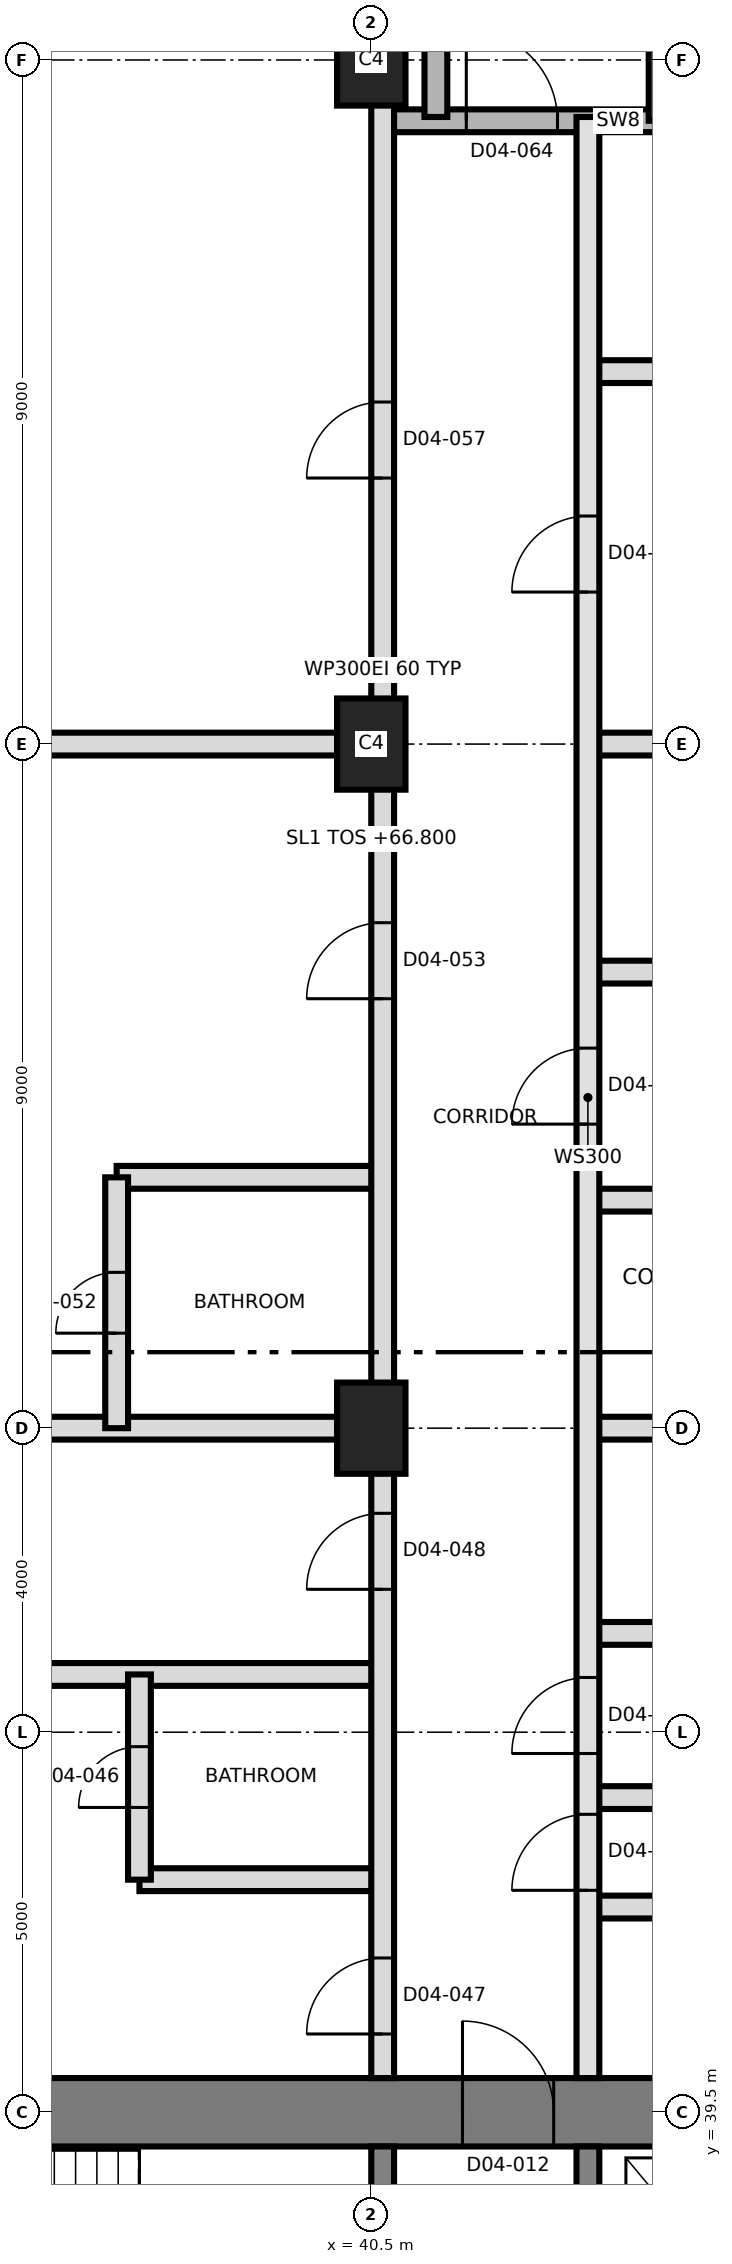
"""IFC4 building model, lengths in metres.
Left out: names, types, materials, properties, quantities, classifications, styles, units other than length and angle.
Written with IfcOpenShell. Run it as: python <this file> out.ifc"""

import sys

from ifc_helpers import new_model, si_unit, direction, frame, frame_2d, origin, origin_2d, place, context, subcontext, project, spatial, rectangle, extrude, element, fill, save


model = new_model("IFC4")
c1 = context("Model", 3, precision=1e-05, world=origin(), true_north=direction((0.0, 1.0)))
c2 = subcontext(c1, "Body", "Model", "MODEL_VIEW")
j1 = project(units=[si_unit("LENGTHUNIT", "METRE"), si_unit("PLANEANGLEUNIT", "RADIAN")], contexts=[c1])
p1 = place(None, origin())
s1 = spatial("IfcSite", under=j1, at=p1, CompositionType="ELEMENT")
p2 = place(p1, origin())
s2 = spatial("IfcBuilding", under=s1, at=p2, CompositionType="ELEMENT")
p3 = place(p2, frame((0.0, 0.0, 66.8)))
s3 = spatial("IfcBuildingStorey", under=s2, at=p3, CompositionType="ELEMENT", Elevation=66.8)
p4 = place(p3, frame((31.05, 39.5, 0.0), z_axis=(0.0, 0.0, 1.0), x_axis=(1.0, 0.0, 0.0)))
e1 = element("IfcWall", 1, at=p4, inside=s3, PredefinedType="SHEAR", context=c2, shape_type="SweptSolid", body=[
    extrude(rectangle(XDim=27.0, YDim=0.9, at=frame_2d((13.5, 0.0))), origin(), (0.0, 0.0, 1.0), 3.7),
])
p5 = place(p4, frame((10.65, 0.0, 0.0)))
e2 = element("IfcOpeningElement", 2, at=p5, cuts=e1, PredefinedType="OPENING", context=c2, shape_type="SweptSolid", body=[
    extrude(rectangle(XDim=1.2, YDim=2.1, at=frame_2d((0.6, 1.05))), frame((0.0, 0.46, 0.0), z_axis=(0.0, -1.0, 0.0), x_axis=(1.0, 0.0, 0.0)), (0.0, 0.0, 1.0), 0.92),
])
for number, where, z_axis, x_axis in (
    (3, (40.65, 33.5, 0.0), (0.0, 0.0, 1.0), (0.0, 1.0, 0.0)),
    (4, (43.35, 33.5, 0.0), (0.0, 0.0, 1.0), (0.0, 1.0, 0.0)),
):
    element("IfcWall", number, at=place(p3, frame(where, z_axis=z_axis, x_axis=x_axis)), inside=s3, PredefinedType="SHEAR", context=c2, shape_type="SweptSolid", body=[
        extrude(rectangle(XDim=5.55, YDim=0.3, at=frame_2d((2.775, 0.0))), origin(), (0.0, 0.0, 1.0), 3.7),
    ])
for number, where, z_axis, x_axis in (
    (5, (40.5, 48.5, 0.0), (0.0, 0.0, 1.0), (0.0, 1.0, 0.0)),
    (6, (40.5, 57.5, 0.0), (0.0, 0.0, 1.0), (0.0, 1.0, 0.0)),
    (7, (40.5, 66.5, 0.0), (0.0, 0.0, 1.0), (0.0, 1.0, 0.0)),
):
    element("IfcColumn", number, at=place(p3, frame(where, z_axis=z_axis, x_axis=x_axis)), inside=s3, PredefinedType="COLUMN", context=c2, shape_type="SweptSolid", body=[
        extrude(rectangle(XDim=1.2, YDim=0.9, at=origin_2d()), origin(), (0.0, 0.0, 1.0), 3.7),
    ])
for number, where, z_axis, x_axis in (
    (8, (43.35, 42.2, 0.0), (0.0, 0.0, 1.0), (1.0, 0.0, 0.0)),
    (9, (37.45, 42.56, 0.0), (0.0, 0.0, 1.0), (1.0, 0.0, 0.0)),
):
    element("IfcWall", number, at=place(p3, frame(where, z_axis=z_axis, x_axis=x_axis)), inside=s3, PredefinedType="PARTITIONING", context=c2, shape_type="SweptSolid", body=[
        extrude(rectangle(XDim=3.2, YDim=0.3, at=frame_2d((1.6, 0.0))), origin(), (0.0, 0.0, 1.0), 3.4),
    ])
p6 = place(p3, frame((43.35, 43.64, 0.0), z_axis=(0.0, 0.0, 1.0), x_axis=(1.0, 0.0, 0.0)))
e10 = element("IfcWall", 10, at=p6, inside=s3, PredefinedType="PARTITIONING", context=c2, shape_type="SweptSolid", body=[
    extrude(rectangle(XDim=9.323, YDim=0.3, at=frame_2d((4.662, 0.0))), origin(), (0.0, 0.0, 1.0), 3.35),
])
p7 = place(p3, frame((29.17, 45.26, 0.0), z_axis=(0.0, 0.0, 1.0), x_axis=(1.0, 0.0, 0.0)))
e11 = element("IfcWall", 11, at=p7, inside=s3, PredefinedType="PARTITIONING", context=c2, shape_type="SweptSolid", body=[
    extrude(rectangle(XDim=11.48, YDim=0.3, at=frame_2d((5.74, 0.0))), origin(), (0.0, 0.0, 1.0), 3.35),
])
p8 = place(p3, frame((43.35, 45.8, 0.0), z_axis=(0.0, 0.0, 1.0), x_axis=(1.0, 0.0, 0.0)))
e12 = element("IfcWall", 12, at=p8, inside=s3, PredefinedType="PARTITIONING", context=c2, shape_type="SweptSolid", body=[
    extrude(rectangle(XDim=3.2, YDim=0.3, at=frame_2d((1.6, 0.0))), origin(), (0.0, 0.0, 1.0), 3.4),
])
p9 = place(p3, frame((29.17, 48.5, 0.0), z_axis=(0.0, 0.0, 1.0), x_axis=(1.0, 0.0, 0.0)))
e13 = element("IfcWall", 13, at=p9, inside=s3, PredefinedType="PARTITIONING", context=c2, shape_type="SweptSolid", body=[
    extrude(rectangle(XDim=11.48, YDim=0.3, at=frame_2d((5.74, 0.0))), origin(), (0.0, 0.0, 1.0), 3.35),
])
p10 = place(p3, frame((43.35, 48.5, 0.0), z_axis=(0.0, 0.0, 1.0), x_axis=(1.0, 0.0, 0.0)))
e14 = element("IfcWall", 14, at=p10, inside=s3, PredefinedType="PARTITIONING", context=c2, shape_type="SweptSolid", body=[
    extrude(rectangle(XDim=8.66, YDim=0.3, at=frame_2d((4.33, 0.0))), origin(), (0.0, 0.0, 1.0), 3.35),
])
p11 = place(p3, frame((43.35, 51.5, 0.0), z_axis=(0.0, 0.0, 1.0), x_axis=(1.0, 0.0, 0.0)))
e15 = element("IfcWall", 15, at=p11, inside=s3, PredefinedType="PARTITIONING", context=c2, shape_type="SweptSolid", body=[
    extrude(rectangle(XDim=3.3, YDim=0.3, at=frame_2d((1.65, 0.0))), origin(), (0.0, 0.0, 1.0), 3.4),
])
p12 = place(p3, frame((37.15, 51.8, 0.0), z_axis=(0.0, 0.0, 1.0), x_axis=(1.0, 0.0, 0.0)))
e16 = element("IfcWall", 16, at=p12, inside=s3, PredefinedType="PARTITIONING", context=c2, shape_type="SweptSolid", body=[
    extrude(rectangle(XDim=3.5, YDim=0.3, at=frame_2d((1.75, 0.0))), origin(), (0.0, 0.0, 1.0), 3.4),
])
p13 = place(p3, frame((43.35, 54.5, 0.0), z_axis=(0.0, 0.0, 1.0), x_axis=(1.0, 0.0, 0.0)))
e17 = element("IfcWall", 17, at=p13, inside=s3, PredefinedType="PARTITIONING", context=c2, shape_type="SweptSolid", body=[
    extrude(rectangle(XDim=3.3, YDim=0.3, at=frame_2d((1.65, 0.0))), origin(), (0.0, 0.0, 1.0), 3.4),
])
p14 = place(p3, frame((29.17, 57.5, 0.0), z_axis=(0.0, 0.0, 1.0), x_axis=(1.0, 0.0, 0.0)))
e18 = element("IfcWall", 18, at=p14, inside=s3, PredefinedType="PARTITIONING", context=c2, shape_type="SweptSolid", body=[
    extrude(rectangle(XDim=11.48, YDim=0.3, at=frame_2d((5.74, 0.0))), origin(), (0.0, 0.0, 1.0), 3.35),
])
p15 = place(p3, frame((43.35, 57.5, 0.0), z_axis=(0.0, 0.0, 1.0), x_axis=(1.0, 0.0, 0.0)))
e19 = element("IfcWall", 19, at=p15, inside=s3, PredefinedType="PARTITIONING", context=c2, shape_type="SweptSolid", body=[
    extrude(rectangle(XDim=8.66, YDim=0.3, at=frame_2d((4.33, 0.0))), origin(), (0.0, 0.0, 1.0), 3.35),
])
p16 = place(p3, frame((43.35, 62.4, 0.0), z_axis=(0.0, 0.0, 1.0), x_axis=(1.0, 0.0, 0.0)))
e20 = element("IfcWall", 20, at=p16, inside=s3, PredefinedType="PARTITIONING", context=c2, shape_type="SweptSolid", body=[
    extrude(rectangle(XDim=8.66, YDim=0.3, at=frame_2d((4.33, 0.0))), origin(), (0.0, 0.0, 1.0), 3.35),
])
p17 = place(p16, frame((4.65, 0.0, 0.0)))
e21 = element("IfcOpeningElement", 21, at=p17, cuts=e20, PredefinedType="OPENING", context=c2, shape_type="SweptSolid", body=[
    extrude(rectangle(XDim=1.0, YDim=2.1, at=frame_2d((0.5, 1.05))), frame((0.0, 0.16, 0.0), z_axis=(0.0, -1.0, 0.0), x_axis=(1.0, 0.0, 0.0)), (0.0, 0.0, 1.0), 0.32),
])
p18 = place(p3, frame((40.65, 65.7, 0.0), z_axis=(0.0, 0.0, 1.0), x_axis=(1.0, 0.0, 0.0)))
e22 = element("IfcWall", 22, at=p18, inside=s3, PredefinedType="SHEAR", context=c2, shape_type="SweptSolid", body=[
    extrude(rectangle(XDim=6.2, YDim=0.3, at=frame_2d((3.1, 0.0))), origin(), (0.0, 0.0, 1.0), 3.4),
])
p19 = place(p18, frame((1.1, 0.0, 0.0)))
e23 = element("IfcOpeningElement", 23, at=p19, cuts=e22, PredefinedType="OPENING", context=c2, shape_type="SweptSolid", body=[
    extrude(rectangle(XDim=1.2, YDim=2.1, at=frame_2d((0.6, 1.05))), frame((0.0, 0.16, 0.0), z_axis=(0.0, -1.0, 0.0), x_axis=(1.0, 0.0, 0.0)), (0.0, 0.0, 1.0), 0.32),
])
p20 = place(p3, frame((37.15, 48.5, 0.0), z_axis=(0.0, 0.0, 1.0), x_axis=(0.0, 1.0, 0.0)))
e24 = element("IfcWall", 24, at=p20, inside=s3, PredefinedType="PARTITIONING", context=c2, shape_type="SweptSolid", body=[
    extrude(rectangle(XDim=3.3, YDim=0.3, at=frame_2d((1.65, 0.0))), origin(), (0.0, 0.0, 1.0), 3.4),
])
p21 = place(p20, frame((1.25, 0.0, 0.0)))
e25 = element("IfcOpeningElement", 25, at=p21, cuts=e24, PredefinedType="OPENING", context=c2, shape_type="SweptSolid", body=[
    extrude(rectangle(XDim=0.8, YDim=2.1, at=frame_2d((0.4, 1.05))), frame((0.0, 0.16, 0.0), z_axis=(0.0, -1.0, 0.0), x_axis=(1.0, 0.0, 0.0)), (0.0, 0.0, 1.0), 0.32),
])
p22 = place(p3, frame((37.45, 42.56, 0.0), z_axis=(0.0, 0.0, 1.0), x_axis=(0.0, 1.0, 0.0)))
e26 = element("IfcWall", 26, at=p22, inside=s3, PredefinedType="PARTITIONING", context=c2, shape_type="SweptSolid", body=[
    extrude(rectangle(XDim=2.7, YDim=0.3, at=frame_2d((1.35, 0.0))), origin(), (0.0, 0.0, 1.0), 3.4),
])
p23 = place(p22, frame((0.95, 0.0, 0.0)))
e27 = element("IfcOpeningElement", 27, at=p23, cuts=e26, PredefinedType="OPENING", context=c2, shape_type="SweptSolid", body=[
    extrude(rectangle(XDim=0.8, YDim=2.1, at=frame_2d((0.4, 1.05))), frame((0.0, 0.16, 0.0), z_axis=(0.0, -1.0, 0.0), x_axis=(1.0, 0.0, 0.0)), (0.0, 0.0, 1.0), 0.32),
])
p24 = place(p3, frame((40.65, 39.95, 0.0), z_axis=(0.0, 0.0, 1.0), x_axis=(0.0, 1.0, 0.0)))
e28 = element("IfcWall", 28, at=p24, inside=s3, PredefinedType="PARTITIONING", context=c2, shape_type="SweptSolid", body=[
    extrude(rectangle(XDim=37.05, YDim=0.3, at=frame_2d((18.525, 0.0))), origin(), (0.0, 0.0, 1.0), 3.35),
])
p25 = place(p24, frame((0.58, 0.0, 0.0)))
e29 = element("IfcOpeningElement", 29, at=p25, cuts=e28, PredefinedType="OPENING", context=c2, shape_type="SweptSolid", body=[
    extrude(rectangle(XDim=1.0, YDim=2.1, at=frame_2d((0.5, 1.05))), frame((0.0, 0.16, 0.0), z_axis=(0.0, -1.0, 0.0), x_axis=(1.0, 0.0, 0.0)), (0.0, 0.0, 1.0), 0.32),
])
p26 = place(p24, frame((6.43, 0.0, 0.0)))
e30 = element("IfcOpeningElement", 30, at=p26, cuts=e28, PredefinedType="OPENING", context=c2, shape_type="SweptSolid", body=[
    extrude(rectangle(XDim=1.0, YDim=2.1, at=frame_2d((0.5, 1.05))), frame((0.0, 0.16, 0.0), z_axis=(0.0, -1.0, 0.0), x_axis=(1.0, 0.0, 0.0)), (0.0, 0.0, 1.0), 0.32),
])
p27 = place(p24, frame((14.2, 0.0, 0.0)))
e31 = element("IfcOpeningElement", 31, at=p27, cuts=e28, PredefinedType="OPENING", context=c2, shape_type="SweptSolid", body=[
    extrude(rectangle(XDim=1.0, YDim=2.4, at=frame_2d((0.5, 1.2))), frame((0.0, 0.16, 0.0), z_axis=(0.0, -1.0, 0.0), x_axis=(1.0, 0.0, 0.0)), (0.0, 0.0, 1.0), 0.32),
])
p28 = place(p24, frame((21.05, 0.0, 0.0)))
e32 = element("IfcOpeningElement", 32, at=p28, cuts=e28, PredefinedType="OPENING", context=c2, shape_type="SweptSolid", body=[
    extrude(rectangle(XDim=1.0, YDim=2.4, at=frame_2d((0.5, 1.2))), frame((0.0, 0.16, 0.0), z_axis=(0.0, -1.0, 0.0), x_axis=(1.0, 0.0, 0.0)), (0.0, 0.0, 1.0), 0.32),
])
p29 = place(p3, frame((41.35, 65.75, 0.0), z_axis=(0.0, 0.0, 1.0), x_axis=(0.0, 1.0, 0.0)))
e33 = element("IfcWall", 33, at=p29, inside=s3, PredefinedType="SHEAR", context=c2, shape_type="SweptSolid", body=[
    extrude(rectangle(XDim=8.85, YDim=0.3, at=frame_2d((4.425, 0.0))), origin(), (0.0, 0.0, 1.0), 3.4),
])
p30 = place(p3, frame((43.35, 39.95, 0.0), z_axis=(0.0, 0.0, 1.0), x_axis=(0.0, 1.0, 0.0)))
e34 = element("IfcWall", 34, at=p30, inside=s3, PredefinedType="SOLIDWALL", context=c2, shape_type="SweptSolid", body=[
    extrude(rectangle(XDim=25.8, YDim=0.3, at=frame_2d((12.9, 0.0))), origin(), (0.0, 0.0, 1.0), 3.4),
])
p31 = place(p30, frame((2.47, 0.0, 0.0)))
e35 = element("IfcOpeningElement", 35, at=p31, cuts=e34, PredefinedType="OPENING", context=c2, shape_type="SweptSolid", body=[
    extrude(rectangle(XDim=1.0, YDim=2.1, at=frame_2d((0.5, 1.05))), frame((0.0, 0.16, 0.0), z_axis=(0.0, -1.0, 0.0), x_axis=(1.0, 0.0, 0.0)), (0.0, 0.0, 1.0), 0.32),
])
p32 = place(p30, frame((4.27, 0.0, 0.0)))
e36 = element("IfcOpeningElement", 36, at=p32, cuts=e34, PredefinedType="OPENING", context=c2, shape_type="SweptSolid", body=[
    extrude(rectangle(XDim=1.0, YDim=2.1, at=frame_2d((0.5, 1.05))), frame((0.0, 0.16, 0.0), z_axis=(0.0, -1.0, 0.0), x_axis=(1.0, 0.0, 0.0)), (0.0, 0.0, 1.0), 0.32),
])
p33 = place(p30, frame((12.55, 0.0, 0.0)))
e37 = element("IfcOpeningElement", 37, at=p33, cuts=e34, PredefinedType="OPENING", context=c2, shape_type="SweptSolid", body=[
    extrude(rectangle(XDim=1.0, YDim=2.4, at=frame_2d((0.5, 1.2))), frame((0.0, 0.16, 0.0), z_axis=(0.0, -1.0, 0.0), x_axis=(1.0, 0.0, 0.0)), (0.0, 0.0, 1.0), 0.32),
])
p34 = place(p30, frame((19.55, 0.0, 0.0)))
e38 = element("IfcOpeningElement", 38, at=p34, cuts=e34, PredefinedType="OPENING", context=c2, shape_type="SweptSolid", body=[
    extrude(rectangle(XDim=1.0, YDim=2.4, at=frame_2d((0.5, 1.2))), frame((0.0, 0.16, 0.0), z_axis=(0.0, -1.0, 0.0), x_axis=(1.0, 0.0, 0.0)), (0.0, 0.0, 1.0), 0.32),
])
p35 = place(p3, frame((44.3, 65.7, 0.0), z_axis=(0.0, 0.0, 1.0), x_axis=(0.0, 1.0, 0.0)))
e39 = element("IfcWall", 39, at=p35, inside=s3, PredefinedType="SHEAR", context=c2, shape_type="SweptSolid", body=[
    extrude(rectangle(XDim=8.9, YDim=0.3, at=frame_2d((4.45, 0.0))), origin(), (0.0, 0.0, 1.0), 3.4),
])
p36 = place(p5, origin())
e40 = element("IfcDoor", 40, at=p36, inside=s3, OperationType="SINGLE_SWING_RIGHT", PredefinedType="DOOR", context=c2, shape_type="SweptSolid", body=[
    extrude(rectangle(XDim=1.2, YDim=2.1, at=frame_2d((0.6, 1.05))), frame((0.0, 0.025, 0.0), z_axis=(0.0, -1.0, 0.0), x_axis=(1.0, 0.0, 0.0)), (0.0, 0.0, 1.0), 0.05),
])
fill(e2, e40)
p37 = place(p31, origin())
e41 = element("IfcDoor", 41, at=p37, inside=s3, OperationType="SINGLE_SWING_LEFT", PredefinedType="DOOR", context=c2, shape_type="SweptSolid", body=[
    extrude(rectangle(XDim=1.0, YDim=2.1, at=frame_2d((0.5, 1.05))), frame((0.0, 0.025, 0.0), z_axis=(0.0, -1.0, 0.0), x_axis=(1.0, 0.0, 0.0)), (0.0, 0.0, 1.0), 0.05),
])
fill(e35, e41)
p38 = place(p32, origin())
e42 = element("IfcDoor", 42, at=p38, inside=s3, OperationType="SINGLE_SWING_LEFT", PredefinedType="DOOR", context=c2, shape_type="SweptSolid", body=[
    extrude(rectangle(XDim=1.0, YDim=2.1, at=frame_2d((0.5, 1.05))), frame((0.0, 0.025, 0.0), z_axis=(0.0, -1.0, 0.0), x_axis=(1.0, 0.0, 0.0)), (0.0, 0.0, 1.0), 0.05),
])
fill(e36, e42)
p39 = place(p23, origin())
e43 = element("IfcDoor", 43, at=p39, inside=s3, OperationType="SINGLE_SWING_LEFT", PredefinedType="DOOR", context=c2, shape_type="SweptSolid", body=[
    extrude(rectangle(XDim=0.8, YDim=2.1, at=frame_2d((0.4, 1.05))), frame((0.0, 0.025, 0.0), z_axis=(0.0, -1.0, 0.0), x_axis=(1.0, 0.0, 0.0)), (0.0, 0.0, 1.0), 0.05),
])
fill(e27, e43)
p40 = place(p25, origin())
e44 = element("IfcDoor", 44, at=p40, inside=s3, OperationType="SINGLE_SWING_RIGHT", PredefinedType="DOOR", context=c2, shape_type="SweptSolid", body=[
    extrude(rectangle(XDim=1.0, YDim=2.1, at=frame_2d((0.5, 1.05))), frame((0.0, 0.025, 0.0), z_axis=(0.0, -1.0, 0.0), x_axis=(1.0, 0.0, 0.0)), (0.0, 0.0, 1.0), 0.05),
])
fill(e29, e44)
p41 = place(p26, origin())
e45 = element("IfcDoor", 45, at=p41, inside=s3, OperationType="SINGLE_SWING_LEFT", PredefinedType="DOOR", context=c2, shape_type="SweptSolid", body=[
    extrude(rectangle(XDim=1.0, YDim=2.1, at=frame_2d((0.5, 1.05))), frame((0.0, 0.025, 0.0), z_axis=(0.0, -1.0, 0.0), x_axis=(1.0, 0.0, 0.0)), (0.0, 0.0, 1.0), 0.05),
])
fill(e30, e45)
p42 = place(p33, origin())
e46 = element("IfcDoor", 46, at=p42, inside=s3, OperationType="SINGLE_SWING_RIGHT", PredefinedType="DOOR", context=c2, shape_type="SweptSolid", body=[
    extrude(rectangle(XDim=1.0, YDim=2.4, at=frame_2d((0.5, 1.2))), frame((0.0, 0.025, 0.0), z_axis=(0.0, -1.0, 0.0), x_axis=(1.0, 0.0, 0.0)), (0.0, 0.0, 1.0), 0.05),
])
fill(e37, e46)
p43 = place(p21, origin())
e47 = element("IfcDoor", 47, at=p43, inside=s3, OperationType="SINGLE_SWING_LEFT", PredefinedType="DOOR", context=c2, shape_type="SweptSolid", body=[
    extrude(rectangle(XDim=0.8, YDim=2.1, at=frame_2d((0.4, 1.05))), frame((0.0, 0.025, 0.0), z_axis=(0.0, -1.0, 0.0), x_axis=(1.0, 0.0, 0.0)), (0.0, 0.0, 1.0), 0.05),
])
fill(e25, e47)
p44 = place(p27, origin())
e48 = element("IfcDoor", 48, at=p44, inside=s3, OperationType="SINGLE_SWING_RIGHT", PredefinedType="DOOR", context=c2, shape_type="SweptSolid", body=[
    extrude(rectangle(XDim=1.0, YDim=2.4, at=frame_2d((0.5, 1.2))), frame((0.0, 0.025, 0.0), z_axis=(0.0, -1.0, 0.0), x_axis=(1.0, 0.0, 0.0)), (0.0, 0.0, 1.0), 0.05),
])
fill(e31, e48)
p45 = place(p34, origin())
e49 = element("IfcDoor", 49, at=p45, inside=s3, OperationType="SINGLE_SWING_LEFT", PredefinedType="DOOR", context=c2, shape_type="SweptSolid", body=[
    extrude(rectangle(XDim=1.0, YDim=2.4, at=frame_2d((0.5, 1.2))), frame((0.0, 0.025, 0.0), z_axis=(0.0, -1.0, 0.0), x_axis=(1.0, 0.0, 0.0)), (0.0, 0.0, 1.0), 0.05),
])
fill(e38, e49)
p46 = place(p28, origin())
e50 = element("IfcDoor", 50, at=p46, inside=s3, OperationType="SINGLE_SWING_LEFT", PredefinedType="DOOR", context=c2, shape_type="SweptSolid", body=[
    extrude(rectangle(XDim=1.0, YDim=2.4, at=frame_2d((0.5, 1.2))), frame((0.0, 0.025, 0.0), z_axis=(0.0, -1.0, 0.0), x_axis=(1.0, 0.0, 0.0)), (0.0, 0.0, 1.0), 0.05),
])
fill(e32, e50)
p47 = place(p19, origin())
e51 = element("IfcDoor", 51, at=p47, inside=s3, OperationType="SINGLE_SWING_RIGHT", PredefinedType="DOOR", context=c2, shape_type="SweptSolid", body=[
    extrude(rectangle(XDim=1.2, YDim=2.1, at=frame_2d((0.6, 1.05))), frame((0.0, 0.025, 0.0), z_axis=(0.0, -1.0, 0.0), x_axis=(1.0, 0.0, 0.0)), (0.0, 0.0, 1.0), 0.05),
])
fill(e23, e51)
save(model, sys.argv[1])
